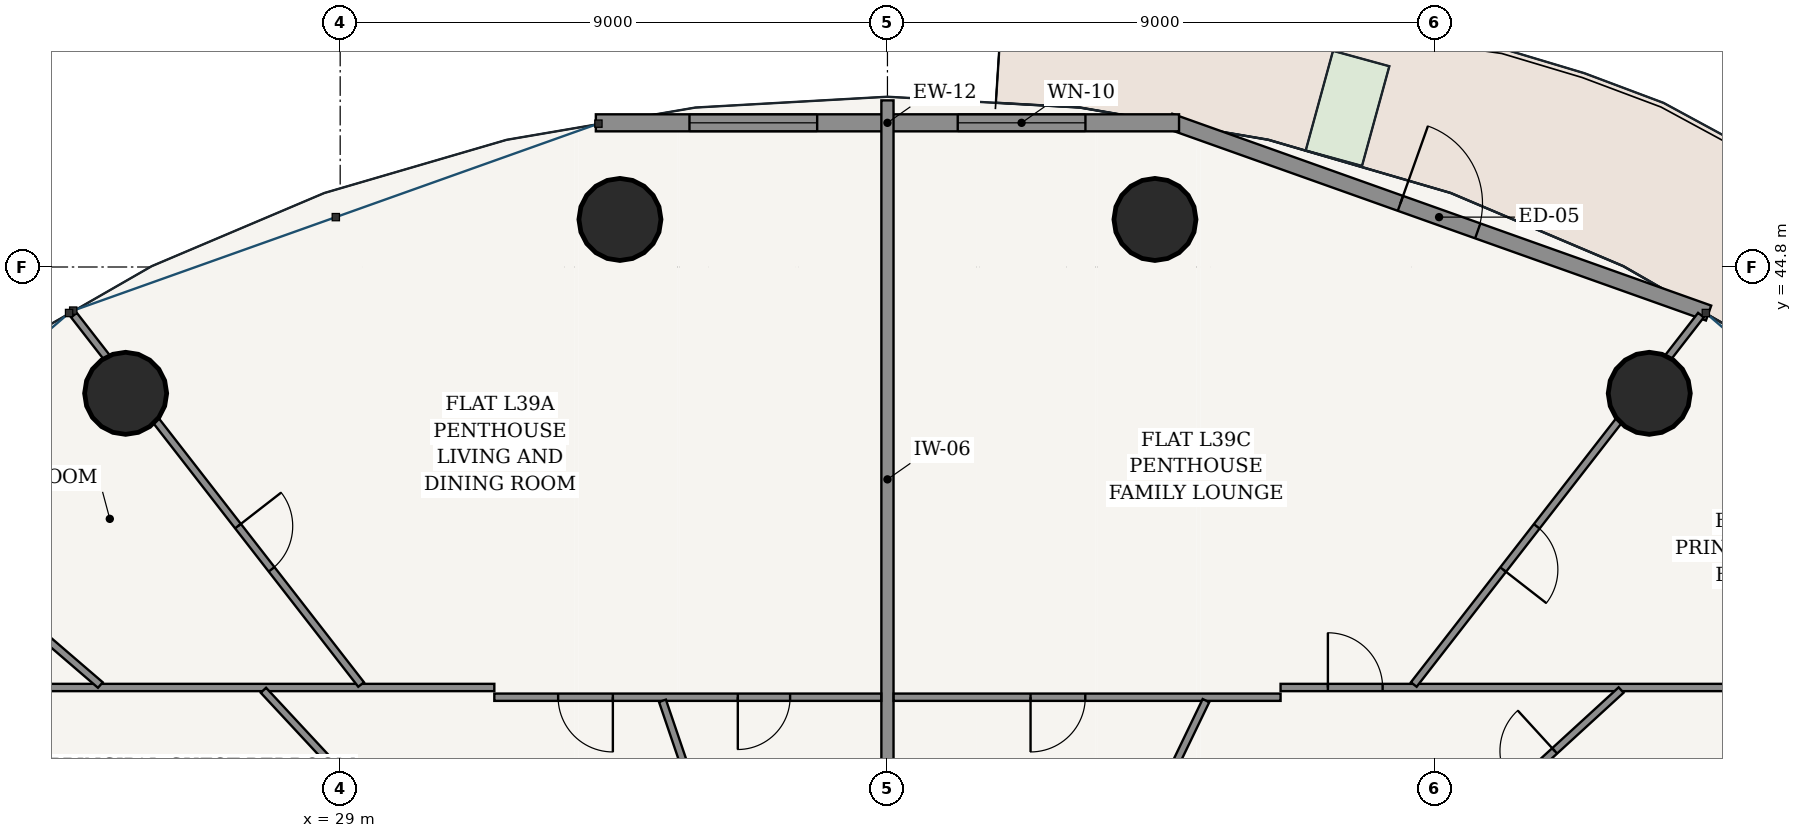
"""IFC4 building model, lengths in metres.
Left out: names, types, materials, properties, quantities, classifications, styles, units other than length and angle.
Written with IfcOpenShell. Run it as: python <this file> out.ifc"""

import sys

from ifc_helpers import new_model, si_unit, direction, frame, frame_2d, origin, origin_2d, place, context, subcontext, project, spatial, rectangle, hollow_circle, extrude, source, transform, mapped, element, fill, save


model = new_model("IFC4")
c1 = context("Model", 3, precision=1e-05, world=origin(), true_north=direction((-0.2419218956, 0.970295726276)))
c2 = subcontext(c1, "Body", "Model", "MODEL_VIEW")
j1 = project(units=[si_unit("LENGTHUNIT", "METRE"), si_unit("PLANEANGLEUNIT", "RADIAN")], contexts=[c1])
p1 = place(None, origin())
s1 = spatial("IfcSite", under=j1, at=p1, CompositionType="ELEMENT")
p2 = place(p1, origin())
s2 = spatial("IfcBuilding", under=s1, at=p2, CompositionType="ELEMENT")
p3 = place(p2, frame((0.0, 0.0, 149.8)))
s3 = spatial("IfcBuildingStorey", under=s2, at=p3, CompositionType="ELEMENT", Elevation=149.8)
for number, where, z_axis, x_axis in (
    (1, (50.528, 42.723, 0.0), (0.0, 0.0, 1.0), (1.0, 0.0, 0.0)),
    (2, (42.399, 45.582, 0.0), (0.0, 0.0, 1.0), (1.0, 0.0, 0.0)),
    (3, (33.601, 45.582, 0.0), (0.0, 0.0, 1.0), (1.0, 0.0, 0.0)),
    (4, (25.472, 42.723, 0.0), (0.0, 0.0, 1.0), (1.0, 0.0, 0.0)),
):
    element("IfcColumn", number, at=place(p3, frame(where, z_axis=z_axis, x_axis=x_axis)), inside=s3, PredefinedType="COLUMN", context=c2, shape_type="SweptSolid", body=[
        extrude(hollow_circle(Radius=0.675, WallThickness=0.042, at=origin_2d()), origin(), (0.0, 0.0, 1.0), 3.6),
    ])
p4 = place(p3, frame((51.503, 44.043, 0.0), z_axis=(0.0, 0.0, 1.0), x_axis=(-0.942095406405, 0.335344964522, 0.0)))
e5 = element("IfcWall", 5, at=p4, inside=s3, PredefinedType="SOLIDWALL", context=c2, shape_type="SweptSolid", body=[
    extrude(rectangle(XDim=9.408, YDim=0.26, at=frame_2d((4.704, 0.0))), origin(), (0.0, 0.0, 1.0), 3.33),
])
p5 = place(p4, frame((4.029, 0.0, 0.0)))
e6 = element("IfcOpeningElement", 6, at=p5, cuts=e5, PredefinedType="OPENING", context=c2, shape_type="SweptSolid", body=[
    extrude(rectangle(XDim=1.35, YDim=2.2, at=frame_2d((0.675, 1.1))), frame((0.0, 0.14, 0.0), z_axis=(0.0, -1.0, 0.0), x_axis=(1.0, 0.0, 0.0)), (0.0, 0.0, 1.0), 0.28),
])
p6 = place(p3, frame((42.795, 47.171, 0.0), z_axis=(0.0, 0.0, 1.0), x_axis=(-1.0, 0.0, 0.0)))
e7 = element("IfcWall", 7, at=p6, inside=s3, PredefinedType="SOLIDWALL", context=c2, shape_type="SweptSolid", body=[
    extrude(rectangle(XDim=9.591, YDim=0.28, at=frame_2d((4.795, 0.0))), origin(), (0.0, 0.0, 1.0), 3.33),
])
p7 = place(p6, frame((1.54, 0.0, 0.85)))
e8 = element("IfcOpeningElement", 8, at=p7, cuts=e7, PredefinedType="OPENING", context=c2, shape_type="SweptSolid", body=[
    extrude(rectangle(XDim=2.1, YDim=1.95, at=frame_2d((1.05, 0.975))), frame((0.0, 0.15, 0.0), z_axis=(0.0, -1.0, 0.0), x_axis=(1.0, 0.0, 0.0)), (0.0, 0.0, 1.0), 0.3),
])
p8 = place(p6, frame((5.951, 0.0, 0.85)))
e9 = element("IfcOpeningElement", 9, at=p8, cuts=e7, PredefinedType="OPENING", context=c2, shape_type="SweptSolid", body=[
    extrude(rectangle(XDim=2.1, YDim=1.95, at=frame_2d((1.05, 0.975))), frame((0.0, 0.15, 0.0), z_axis=(0.0, -1.0, 0.0), x_axis=(1.0, 0.0, 0.0)), (0.0, 0.0, 1.0), 0.3),
])
p9 = place(p3, frame((38.0, 35.075, 0.0), z_axis=(0.0, 0.0, 1.0), x_axis=(0.0, 1.0, 0.0)))
e10 = element("IfcWall", 10, at=p9, inside=s3, PredefinedType="PARTITIONING", context=c2, shape_type="SweptSolid", body=[
    extrude(rectangle(XDim=12.465, YDim=0.2, at=frame_2d((6.232, 0.0))), origin(), (0.0, 0.0, 1.0), 2.415),
])
p10 = place(p3, frame((24.065, 37.885, 0.0), z_axis=(0.0, 0.0, 1.0), x_axis=(1.0, 0.0, 0.0)))
e11 = element("IfcWall", 11, at=p10, inside=s3, PredefinedType="PARTITIONING", context=c2, shape_type="SweptSolid", body=[
    extrude(rectangle(XDim=7.47, YDim=0.12, at=frame_2d((3.735, 0.0))), origin(), (0.0, 0.0, 1.0), 2.776),
])
p11 = place(p3, frame((31.535, 37.725, 0.0), z_axis=(0.0, 0.0, 1.0), x_axis=(1.0, 0.0, 0.0)))
e12 = element("IfcWall", 12, at=p11, inside=s3, PredefinedType="PARTITIONING", context=c2, shape_type="SweptSolid", body=[
    extrude(rectangle(XDim=6.363, YDim=0.12, at=frame_2d((3.182, 0.0))), origin(), (0.0, 0.0, 1.0), 2.776),
])
p12 = place(p11, frame((4.004, 0.0, 0.0)))
e13 = element("IfcOpeningElement", 13, at=p12, cuts=e12, PredefinedType="OPENING", context=c2, shape_type="SweptSolid", body=[
    extrude(rectangle(XDim=0.86, YDim=2.15, at=frame_2d((0.43, 1.075))), frame((0.0, 0.07, 0.0), z_axis=(0.0, -1.0, 0.0), x_axis=(1.0, 0.0, 0.0)), (0.0, 0.0, 1.0), 0.14),
])
p13 = place(p11, frame((1.049, 0.0, 0.0)))
e14 = element("IfcOpeningElement", 14, at=p13, cuts=e12, PredefinedType="OPENING", context=c2, shape_type="SweptSolid", body=[
    extrude(rectangle(XDim=0.9, YDim=2.15, at=frame_2d((0.45, 1.075))), frame((0.0, 0.07, 0.0), z_axis=(0.0, -1.0, 0.0), x_axis=(1.0, 0.0, 0.0)), (0.0, 0.0, 1.0), 0.14),
])
p14 = place(p3, frame((29.344, 37.934, 0.0), z_axis=(0.0, 0.0, 1.0), x_axis=(-0.613758289074, 0.789493991487, 0.0)))
e15 = element("IfcWall", 15, at=p14, inside=s3, PredefinedType="PARTITIONING", context=c2, shape_type="SweptSolid", body=[
    extrude(rectangle(XDim=7.695, YDim=0.12, at=frame_2d((3.848, 0.0))), origin(), (0.0, 0.0, 1.0), 2.776),
])
p15 = place(p14, frame((2.399, 0.0, 0.0)))
e16 = element("IfcOpeningElement", 16, at=p15, cuts=e15, PredefinedType="OPENING", context=c2, shape_type="SweptSolid", body=[
    extrude(rectangle(XDim=0.9, YDim=2.15, at=frame_2d((0.45, 1.075))), frame((0.0, 0.07, 0.0), z_axis=(0.0, -1.0, 0.0), x_axis=(1.0, 0.0, 0.0)), (0.0, 0.0, 1.0), 0.14),
])
p16 = place(p3, frame((25.056, 37.925, 0.0), z_axis=(0.0, 0.0, 1.0), x_axis=(-0.758354915574, 0.65184186888, 0.0)))
e17 = element("IfcWall", 17, at=p16, inside=s3, PredefinedType="PARTITIONING", context=c2, shape_type="SweptSolid", body=[
    extrude(rectangle(XDim=5.432, YDim=0.12, at=frame_2d((2.716, 0.0))), origin(), (0.0, 0.0, 1.0), 2.846),
])
p17 = place(p16, frame((2.266, 0.0, 0.0)))
e18 = element("IfcOpeningElement", 18, at=p17, cuts=e17, PredefinedType="OPENING", context=c2, shape_type="SweptSolid", body=[
    extrude(rectangle(XDim=0.9, YDim=2.15, at=frame_2d((0.45, 1.075))), frame((0.0, 0.07, 0.0), z_axis=(0.0, -1.0, 0.0), x_axis=(1.0, 0.0, 0.0)), (0.0, 0.0, 1.0), 0.14),
])
p18 = place(p3, frame((35.182, 35.075, 0.0), z_axis=(0.0, 0.0, 1.0), x_axis=(-0.322321614946, 0.946630221649, 0.0)))
e19 = element("IfcWall", 19, at=p18, inside=s3, PredefinedType="PARTITIONING", context=c2, shape_type="SweptSolid", body=[
    extrude(rectangle(XDim=2.737, YDim=0.12, at=frame_2d((1.369, 0.0))), origin(), (0.0, 0.0, 1.0), 2.415),
])
p19 = place(p3, frame((30.307, 35.075, 0.0), z_axis=(0.0, 0.0, 1.0), x_axis=(-0.68082810609, 0.732443233267, 0.0)))
e20 = element("IfcWall", 20, at=p19, inside=s3, PredefinedType="PARTITIONING", context=c2, shape_type="SweptSolid", body=[
    extrude(rectangle(XDim=3.775, YDim=0.12, at=frame_2d((1.887, 0.0))), origin(), (0.0, 0.0, 1.0), 2.776),
])
p20 = place(p3, frame((38.102, 37.725, 0.0), z_axis=(0.0, 0.0, 1.0), x_axis=(1.0, 0.0, 0.0)))
e21 = element("IfcWall", 21, at=p20, inside=s3, PredefinedType="PARTITIONING", context=c2, shape_type="SweptSolid", body=[
    extrude(rectangle(XDim=6.363, YDim=0.12, at=frame_2d((3.182, 0.0))), origin(), (0.0, 0.0, 1.0), 2.776),
])
p21 = place(p20, frame((2.251, 0.0, 0.0)))
e22 = element("IfcOpeningElement", 22, at=p21, cuts=e21, PredefinedType="OPENING", context=c2, shape_type="SweptSolid", body=[
    extrude(rectangle(XDim=0.9, YDim=2.15, at=frame_2d((0.45, 1.075))), frame((0.0, 0.07, 0.0), z_axis=(0.0, -1.0, 0.0), x_axis=(1.0, 0.0, 0.0)), (0.0, 0.0, 1.0), 0.14),
])
p22 = place(p3, frame((44.465, 37.885, 0.0), z_axis=(0.0, 0.0, 1.0), x_axis=(1.0, 0.0, 0.0)))
e23 = element("IfcWall", 23, at=p22, inside=s3, PredefinedType="PARTITIONING", context=c2, shape_type="SweptSolid", body=[
    extrude(rectangle(XDim=7.47, YDim=0.12, at=frame_2d((3.735, 0.0))), origin(), (0.0, 0.0, 1.0), 2.776),
])
p23 = place(p22, frame((0.778, 0.0, 0.0)))
e24 = element("IfcOpeningElement", 24, at=p23, cuts=e23, PredefinedType="OPENING", context=c2, shape_type="SweptSolid", body=[
    extrude(rectangle(XDim=0.9, YDim=2.15, at=frame_2d((0.45, 1.075))), frame((0.0, 0.07, 0.0), z_axis=(0.0, -1.0, 0.0), x_axis=(1.0, 0.0, 0.0)), (0.0, 0.0, 1.0), 0.14),
])
p24 = place(p3, frame((46.656, 37.934, 0.0), z_axis=(0.0, 0.0, 1.0), x_axis=(0.613758289074, 0.789493991487, 0.0)))
e25 = element("IfcWall", 25, at=p24, inside=s3, PredefinedType="PARTITIONING", context=c2, shape_type="SweptSolid", body=[
    extrude(rectangle(XDim=7.695, YDim=0.12, at=frame_2d((3.848, 0.0))), origin(), (0.0, 0.0, 1.0), 2.776),
])
p25 = place(p24, frame((2.395, 0.0, 0.0)))
e26 = element("IfcOpeningElement", 26, at=p25, cuts=e25, PredefinedType="OPENING", context=c2, shape_type="SweptSolid", body=[
    extrude(rectangle(XDim=0.9, YDim=2.15, at=frame_2d((0.45, 1.075))), frame((0.0, 0.07, 0.0), z_axis=(0.0, -1.0, 0.0), x_axis=(1.0, 0.0, 0.0)), (0.0, 0.0, 1.0), 0.14),
])
p26 = place(p3, frame((47.216, 35.235, 0.0), z_axis=(0.0, 0.0, 1.0), x_axis=(0.73766811085, 0.675163504816, 0.0)))
e27 = element("IfcWall", 27, at=p26, inside=s3, PredefinedType="PARTITIONING", context=c2, shape_type="SweptSolid", body=[
    extrude(rectangle(XDim=3.863, YDim=0.12, at=frame_2d((1.932, 0.0))), origin(), (0.0, 0.0, 1.0), 2.776),
])
p27 = place(p26, frame((1.481, 0.0, 0.0)))
e28 = element("IfcOpeningElement", 28, at=p27, cuts=e27, PredefinedType="OPENING", context=c2, shape_type="SweptSolid", body=[
    extrude(rectangle(XDim=0.9, YDim=2.15, at=frame_2d((0.45, 1.075))), frame((0.0, 0.07, 0.0), z_axis=(0.0, -1.0, 0.0), x_axis=(1.0, 0.0, 0.0)), (0.0, 0.0, 1.0), 0.14),
])
p28 = place(p3, frame((41.988, 35.075, 0.0), z_axis=(0.0, 0.0, 1.0), x_axis=(0.434144408634, 0.900843289619, 0.0)))
e29 = element("IfcWall", 29, at=p28, inside=s3, PredefinedType="PARTITIONING", context=c2, shape_type="SweptSolid", body=[
    extrude(rectangle(XDim=2.88, YDim=0.12, at=frame_2d((1.44, 0.0))), origin(), (0.0, 0.0, 1.0), 3.33),
])
m1 = source(origin(), c2, "Body", "SweptSolid", [
    extrude(rectangle(XDim=1.35, YDim=2.2, at=frame_2d((0.675, 1.1))), frame((0.0, 0.025, 0.0), z_axis=(0.0, -1.0, 0.0), x_axis=(1.0, 0.0, 0.0)), (0.0, 0.0, 1.0), 0.05),
])
p29 = place(p5, frame((1.35, 0.0, 0.0), z_axis=(0.0, 0.0, 1.0), x_axis=(-1.0, 0.0, 0.0)))
e30 = element("IfcDoor", 30, at=p29, inside=s3, OperationType="SINGLE_SWING_LEFT", PredefinedType="DOOR", context=c2, shape_type="MappedRepresentation", body=[
    mapped(m1, transform((0.0, 0.0, 0.0), scale=1.0)),
])
fill(e6, e30)
m2 = source(origin(), c2, "Body", "SweptSolid", [
    extrude(rectangle(XDim=2.1, YDim=1.95, at=frame_2d((1.05, 0.975))), frame((0.0, 0.03, 0.0), z_axis=(0.0, -1.0, 0.0), x_axis=(1.0, 0.0, 0.0)), (0.0, 0.0, 1.0), 0.06),
])
p30 = place(p7, origin())
e31 = element("IfcWindow", 31, at=p30, inside=s3, PartitioningType="SINGLE_PANEL", PredefinedType="WINDOW", context=c2, shape_type="MappedRepresentation", body=[
    mapped(m2, transform((0.0, 0.0, 0.0), scale=1.0)),
])
fill(e8, e31)
p31 = place(p8, origin())
e32 = element("IfcWindow", 32, at=p31, inside=s3, PartitioningType="SINGLE_PANEL", PredefinedType="WINDOW", context=c2, shape_type="MappedRepresentation", body=[
    mapped(m2, transform((0.0, 0.0, 0.0), scale=1.0)),
])
fill(e9, e32)
m3 = source(origin(), c2, "Body", "SweptSolid", [
    extrude(rectangle(XDim=0.9, YDim=2.15, at=frame_2d((0.45, 1.075))), frame((0.0, 0.025, 0.0), z_axis=(0.0, -1.0, 0.0), x_axis=(1.0, 0.0, 0.0)), (0.0, 0.0, 1.0), 0.05),
])
p32 = place(p15, frame((0.9, 0.0, 0.0), z_axis=(0.0, 0.0, 1.0), x_axis=(-1.0, 0.0, 0.0)))
e33 = element("IfcDoor", 33, at=p32, inside=s3, OperationType="SINGLE_SWING_LEFT", PredefinedType="DOOR", context=c2, shape_type="MappedRepresentation", body=[
    mapped(m3, transform((0.0, 0.0, 0.0), scale=1.0)),
])
fill(e16, e33)
m4 = source(origin(), c2, "Body", "SweptSolid", [
    extrude(rectangle(XDim=0.86, YDim=2.15, at=frame_2d((0.43, 1.075))), frame((0.0, 0.025, 0.0), z_axis=(0.0, -1.0, 0.0), x_axis=(1.0, 0.0, 0.0)), (0.0, 0.0, 1.0), 0.05),
])
p33 = place(p12, frame((0.86, 0.0, 0.0), z_axis=(0.0, 0.0, 1.0), x_axis=(-1.0, 0.0, 0.0)))
e34 = element("IfcDoor", 34, at=p33, inside=s3, OperationType="SINGLE_SWING_RIGHT", PredefinedType="DOOR", context=c2, shape_type="MappedRepresentation", body=[
    mapped(m4, transform((0.0, 0.0, 0.0), scale=1.0)),
])
fill(e13, e34)
p34 = place(p13, frame((0.9, 0.0, 0.0), z_axis=(0.0, 0.0, 1.0), x_axis=(-1.0, 0.0, 0.0)))
e35 = element("IfcDoor", 35, at=p34, inside=s3, OperationType="SINGLE_SWING_LEFT", PredefinedType="DOOR", context=c2, shape_type="MappedRepresentation", body=[
    mapped(m3, transform((0.0, 0.0, 0.0), scale=1.0)),
])
fill(e14, e35)
p35 = place(p27, origin())
e36 = element("IfcDoor", 36, at=p35, inside=s3, OperationType="SINGLE_SWING_RIGHT", PredefinedType="DOOR", context=c2, shape_type="MappedRepresentation", body=[
    mapped(m3, transform((0.0, 0.0, 0.0), scale=1.0)),
])
fill(e28, e36)
p36 = place(p23, origin())
e37 = element("IfcDoor", 37, at=p36, inside=s3, OperationType="SINGLE_SWING_LEFT", PredefinedType="DOOR", context=c2, shape_type="MappedRepresentation", body=[
    mapped(m3, transform((0.0, 0.0, 0.0), scale=1.0)),
])
fill(e24, e37)
p37 = place(p21, frame((0.9, 0.0, 0.0), z_axis=(0.0, 0.0, 1.0), x_axis=(-1.0, 0.0, 0.0)))
e38 = element("IfcDoor", 38, at=p37, inside=s3, OperationType="SINGLE_SWING_RIGHT", PredefinedType="DOOR", context=c2, shape_type="MappedRepresentation", body=[
    mapped(m3, transform((0.0, 0.0, 0.0), scale=1.0)),
])
fill(e22, e38)
p38 = place(p25, frame((0.9, 0.0, 0.0), z_axis=(0.0, 0.0, 1.0), x_axis=(-1.0, 0.0, 0.0)))
e39 = element("IfcDoor", 39, at=p38, inside=s3, OperationType="SINGLE_SWING_RIGHT", PredefinedType="DOOR", context=c2, shape_type="MappedRepresentation", body=[
    mapped(m3, transform((0.0, 0.0, 0.0), scale=1.0)),
])
fill(e26, e39)
save(model, sys.argv[1])
